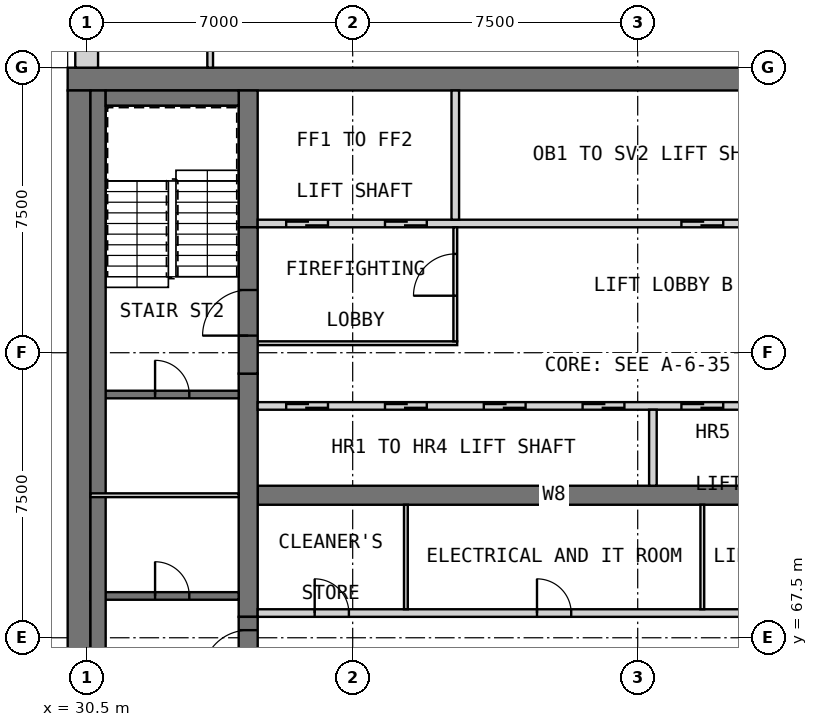
"""IFC4 building model, lengths in metres.
Left out: names, types, materials, properties, quantities, classifications, styles, units other than length and angle.
Written with IfcOpenShell. Run it as: python <this file> out.ifc"""

import sys

from ifc_helpers import new_model, si_unit, direction, frame, frame_2d, origin, place, context, subcontext, project, spatial, rectangle, extrude, element, fill, save


model = new_model("IFC4")
c1 = context("Model", 3, precision=1e-05, world=origin(), true_north=direction((0.0, 1.0)))
c2 = subcontext(c1, "Body", "Model", "MODEL_VIEW")
j1 = project(units=[si_unit("LENGTHUNIT", "METRE"), si_unit("PLANEANGLEUNIT", "RADIAN")], contexts=[c1])
p1 = place(None, origin())
s1 = spatial("IfcSite", under=j1, at=p1, CompositionType="ELEMENT")
p2 = place(p1, origin())
s2 = spatial("IfcBuilding", under=s1, at=p2, CompositionType="ELEMENT")
p3 = place(p2, frame((0.0, 0.0, 266.2)))
s3 = spatial("IfcBuildingStorey", under=s2, at=p3, CompositionType="ELEMENT", Elevation=266.2)
p4 = place(p3, frame((30.0, 82.2, 0.0), z_axis=(0.0, 0.0, 1.0), x_axis=(1.0, 0.0, 0.0)))
e1 = element("IfcWall", 1, at=p4, inside=s3, PredefinedType="SHEAR", context=c2, shape_type="SweptSolid", body=[
    extrude(rectangle(XDim=30.0, YDim=0.6, at=frame_2d((15.0, 0.0))), origin(), (0.0, 0.0, 1.0), 3.5),
])
p5 = place(p3, frame((30.3, 60.6, 0.0), z_axis=(0.0, 0.0, 1.0), x_axis=(0.0, 1.0, 0.0)))
e2 = element("IfcWall", 2, at=p5, inside=s3, PredefinedType="SHEAR", context=c2, shape_type="SweptSolid", body=[
    extrude(rectangle(XDim=21.3, YDim=0.6, at=frame_2d((10.65, 0.0))), origin(), (0.0, 0.0, 1.0), 3.5),
])
p6 = place(p3, frame((35.0, 71.25, 0.0), z_axis=(0.0, 0.0, 1.0), x_axis=(1.0, 0.0, 0.0)))
e3 = element("IfcWall", 3, at=p6, inside=s3, PredefinedType="SHEAR", context=c2, shape_type="SweptSolid", body=[
    extrude(rectangle(XDim=15.6, YDim=0.5, at=frame_2d((7.8, 0.0))), origin(), (0.0, 0.0, 1.0), 3.5),
])
p7 = place(p3, frame((34.75, 68.05, 0.0), z_axis=(0.0, 0.0, 1.0), x_axis=(0.0, 1.0, 0.0)))
e4 = element("IfcWall", 4, at=p7, inside=s3, PredefinedType="SHEAR", context=c2, shape_type="SweptSolid", body=[
    extrude(rectangle(XDim=6.4, YDim=0.5, at=frame_2d((3.2, 0.0))), origin(), (0.0, 0.0, 1.0), 3.5),
])
p8 = place(p3, frame((34.75, 78.3, 0.0), z_axis=(0.0, 0.0, 1.0), x_axis=(0.0, 1.0, 0.0)))
e5 = element("IfcWall", 5, at=p8, inside=s3, PredefinedType="SHEAR", context=c2, shape_type="SweptSolid", body=[
    extrude(rectangle(XDim=3.6, YDim=0.5, at=frame_2d((1.8, 0.0))), origin(), (0.0, 0.0, 1.0), 3.5),
])
p9 = place(p2, frame((0.0, 0.0, 34.0)))
s4 = spatial("IfcBuildingStorey", under=s2, at=p9, CompositionType="ELEMENT", Elevation=34.0)
for number, where, z_axis, x_axis in (
    (6, (29.7, 70.8, 0.0), (0.0, 0.0, 1.0), (0.0, 1.0, 0.0)),
    (7, (29.7, 75.675, 0.0), (0.0, 0.0, 1.0), (0.0, 1.0, 0.0)),
    (8, (29.7, 80.55, 0.0), (0.0, 0.0, 1.0), (0.0, 1.0, 0.0)),
):
    element("IfcWall", number, at=place(p9, frame(where, z_axis=z_axis, x_axis=x_axis)), inside=s4, PredefinedType="SOLIDWALL", context=c2, shape_type="SweptSolid", body=[
        extrude(rectangle(XDim=0.9, YDim=0.6, at=frame_2d((0.45, 0.0))), origin(), (0.0, 0.0, 1.0), 286.2),
    ])
p10 = place(p3, frame((30.5, 89.5, 0.0), z_axis=(0.0, 0.0, 1.0), x_axis=(0.0, -1.0, 0.0)))
e9 = element("IfcWall", 9, at=p10, inside=s3, PredefinedType="SOLIDWALL", context=c2, shape_type="SweptSolid", body=[
    extrude(rectangle(XDim=7.0, YDim=0.6, at=frame_2d((3.5, 0.0))), origin(), (0.0, 0.0, 1.0), 3.25),
])
p11 = place(p10, frame((3.925, 0.0, 0.8)))
e10 = element("IfcOpeningElement", 10, at=p11, cuts=e9, PredefinedType="OPENING", context=c2, shape_type="SweptSolid", body=[
    extrude(rectangle(XDim=2.4, YDim=1.8, at=frame_2d((1.2, 0.9))), frame((0.0, 0.31, 0.0), z_axis=(0.0, -1.0, 0.0), x_axis=(1.0, 0.0, 0.0)), (0.0, 0.0, 1.0), 0.62),
])
p12 = place(p10, frame((0.425, 0.0, 0.8)))
e11 = element("IfcOpeningElement", 11, at=p12, cuts=e9, PredefinedType="OPENING", context=c2, shape_type="SweptSolid", body=[
    extrude(rectangle(XDim=2.4, YDim=1.8, at=frame_2d((1.2, 0.9))), frame((0.0, 0.31, 0.0), z_axis=(0.0, -1.0, 0.0), x_axis=(1.0, 0.0, 0.0)), (0.0, 0.0, 1.0), 0.62),
])
p13 = place(p3, frame((35.0, 68.15, 0.0), z_axis=(0.0, 0.0, 1.0), x_axis=(1.0, 0.0, 0.0)))
e12 = element("IfcWall", 12, at=p13, inside=s3, PredefinedType="PARTITIONING", context=c2, shape_type="SweptSolid", body=[
    extrude(rectangle(XDim=15.6, YDim=0.2, at=frame_2d((7.8, 0.0))), origin(), (0.0, 0.0, 1.0), 3.25),
])
p14 = place(p13, frame((1.5, 0.0, 0.0)))
e13 = element("IfcOpeningElement", 13, at=p14, cuts=e12, PredefinedType="OPENING", context=c2, shape_type="SweptSolid", body=[
    extrude(rectangle(XDim=0.9, YDim=2.1, at=frame_2d((0.45, 1.05))), frame((0.0, 0.11, 0.0), z_axis=(0.0, -1.0, 0.0), x_axis=(1.0, 0.0, 0.0)), (0.0, 0.0, 1.0), 0.22),
])
p15 = place(p13, frame((7.35, 0.0, 0.0)))
e14 = element("IfcOpeningElement", 14, at=p15, cuts=e12, PredefinedType="OPENING", context=c2, shape_type="SweptSolid", body=[
    extrude(rectangle(XDim=0.9, YDim=2.1, at=frame_2d((0.45, 1.05))), frame((0.0, 0.11, 0.0), z_axis=(0.0, -1.0, 0.0), x_axis=(1.0, 0.0, 0.0)), (0.0, 0.0, 1.0), 0.22),
])
p16 = place(p13, frame((13.2, 0.0, 0.0)))
e15 = element("IfcOpeningElement", 15, at=p16, cuts=e12, PredefinedType="OPENING", context=c2, shape_type="SweptSolid", body=[
    extrude(rectangle(XDim=0.9, YDim=2.1, at=frame_2d((0.45, 1.05))), frame((0.0, 0.11, 0.0), z_axis=(0.0, -1.0, 0.0), x_axis=(1.0, 0.0, 0.0)), (0.0, 0.0, 1.0), 0.22),
])
for number, where, z_axis, x_axis in (
    (16, (38.9, 68.25, 0.0), (0.0, 0.0, 1.0), (0.0, 1.0, 0.0)),
    (17, (46.7, 68.25, 0.0), (0.0, 0.0, 1.0), (0.0, 1.0, 0.0)),
):
    element("IfcWall", number, at=place(p3, frame(where, z_axis=z_axis, x_axis=x_axis)), inside=s3, PredefinedType="PARTITIONING", context=c2, shape_type="SweptSolid", body=[
        extrude(rectangle(XDim=2.75, YDim=0.1, at=frame_2d((1.375, 0.0))), origin(), (0.0, 0.0, 1.0), 3.25),
    ])
p17 = place(p3, frame((35.0, 73.6, 0.0), z_axis=(0.0, 0.0, 1.0), x_axis=(1.0, 0.0, 0.0)))
e18 = element("IfcWall", 18, at=p17, inside=s3, PredefinedType="SOLIDWALL", context=c2, shape_type="SweptSolid", body=[
    extrude(rectangle(XDim=15.6, YDim=0.2, at=frame_2d((7.8, 0.0))), origin(), (0.0, 0.0, 1.0), 3.5),
])
p18 = place(p17, frame((0.75, 0.0, 0.0)))
e19 = element("IfcOpeningElement", 19, at=p18, cuts=e18, PredefinedType="OPENING", context=c2, shape_type="SweptSolid", body=[
    extrude(rectangle(XDim=1.1, YDim=2.1, at=frame_2d((0.55, 1.05))), frame((0.0, 0.11, 0.0), z_axis=(0.0, -1.0, 0.0), x_axis=(1.0, 0.0, 0.0)), (0.0, 0.0, 1.0), 0.22),
])
p19 = place(p17, frame((3.35, 0.0, 0.0)))
e20 = element("IfcOpeningElement", 20, at=p19, cuts=e18, PredefinedType="OPENING", context=c2, shape_type="SweptSolid", body=[
    extrude(rectangle(XDim=1.1, YDim=2.1, at=frame_2d((0.55, 1.05))), frame((0.0, 0.11, 0.0), z_axis=(0.0, -1.0, 0.0), x_axis=(1.0, 0.0, 0.0)), (0.0, 0.0, 1.0), 0.22),
])
p20 = place(p17, frame((5.95, 0.0, 0.0)))
e21 = element("IfcOpeningElement", 21, at=p20, cuts=e18, PredefinedType="OPENING", context=c2, shape_type="SweptSolid", body=[
    extrude(rectangle(XDim=1.1, YDim=2.1, at=frame_2d((0.55, 1.05))), frame((0.0, 0.11, 0.0), z_axis=(0.0, -1.0, 0.0), x_axis=(1.0, 0.0, 0.0)), (0.0, 0.0, 1.0), 0.22),
])
p21 = place(p17, frame((8.55, 0.0, 0.0)))
e22 = element("IfcOpeningElement", 22, at=p21, cuts=e18, PredefinedType="OPENING", context=c2, shape_type="SweptSolid", body=[
    extrude(rectangle(XDim=1.1, YDim=2.1, at=frame_2d((0.55, 1.05))), frame((0.0, 0.11, 0.0), z_axis=(0.0, -1.0, 0.0), x_axis=(1.0, 0.0, 0.0)), (0.0, 0.0, 1.0), 0.22),
])
p22 = place(p17, frame((11.15, 0.0, 0.0)))
e23 = element("IfcOpeningElement", 23, at=p22, cuts=e18, PredefinedType="OPENING", context=c2, shape_type="SweptSolid", body=[
    extrude(rectangle(XDim=1.1, YDim=2.1, at=frame_2d((0.55, 1.05))), frame((0.0, 0.11, 0.0), z_axis=(0.0, -1.0, 0.0), x_axis=(1.0, 0.0, 0.0)), (0.0, 0.0, 1.0), 0.22),
])
p23 = place(p17, frame((13.75, 0.0, 0.0)))
e24 = element("IfcOpeningElement", 24, at=p23, cuts=e18, PredefinedType="OPENING", context=c2, shape_type="SweptSolid", body=[
    extrude(rectangle(XDim=1.1, YDim=2.1, at=frame_2d((0.55, 1.05))), frame((0.0, 0.11, 0.0), z_axis=(0.0, -1.0, 0.0), x_axis=(1.0, 0.0, 0.0)), (0.0, 0.0, 1.0), 0.22),
])
p24 = place(p3, frame((45.4, 71.5, 0.0), z_axis=(0.0, 0.0, 1.0), x_axis=(0.0, 1.0, 0.0)))
e25 = element("IfcWall", 25, at=p24, inside=s3, PredefinedType="SOLIDWALL", context=c2, shape_type="SweptSolid", body=[
    extrude(rectangle(XDim=2.0, YDim=0.2, at=frame_2d((1.0, 0.0))), origin(), (0.0, 0.0, 1.0), 3.5),
])
p25 = place(p3, frame((35.0, 78.4, 0.0), z_axis=(0.0, 0.0, 1.0), x_axis=(1.0, 0.0, 0.0)))
e26 = element("IfcWall", 26, at=p25, inside=s3, PredefinedType="SOLIDWALL", context=c2, shape_type="SweptSolid", body=[
    extrude(rectangle(XDim=15.6, YDim=0.2, at=frame_2d((7.8, 0.0))), origin(), (0.0, 0.0, 1.0), 3.5),
])
p26 = place(p25, frame((0.75, 0.0, 0.0)))
e27 = element("IfcOpeningElement", 27, at=p26, cuts=e26, PredefinedType="OPENING", context=c2, shape_type="SweptSolid", body=[
    extrude(rectangle(XDim=1.1, YDim=2.1, at=frame_2d((0.55, 1.05))), frame((0.0, 0.11, 0.0), z_axis=(0.0, -1.0, 0.0), x_axis=(1.0, 0.0, 0.0)), (0.0, 0.0, 1.0), 0.22),
])
p27 = place(p25, frame((3.35, 0.0, 0.0)))
e28 = element("IfcOpeningElement", 28, at=p27, cuts=e26, PredefinedType="OPENING", context=c2, shape_type="SweptSolid", body=[
    extrude(rectangle(XDim=1.1, YDim=2.1, at=frame_2d((0.55, 1.05))), frame((0.0, 0.11, 0.0), z_axis=(0.0, -1.0, 0.0), x_axis=(1.0, 0.0, 0.0)), (0.0, 0.0, 1.0), 0.22),
])
p28 = place(p25, frame((11.15, 0.0, 0.0)))
e29 = element("IfcOpeningElement", 29, at=p28, cuts=e26, PredefinedType="OPENING", context=c2, shape_type="SweptSolid", body=[
    extrude(rectangle(XDim=1.1, YDim=2.1, at=frame_2d((0.55, 1.05))), frame((0.0, 0.11, 0.0), z_axis=(0.0, -1.0, 0.0), x_axis=(1.0, 0.0, 0.0)), (0.0, 0.0, 1.0), 0.22),
])
p29 = place(p25, frame((13.75, 0.0, 0.0)))
e30 = element("IfcOpeningElement", 30, at=p29, cuts=e26, PredefinedType="OPENING", context=c2, shape_type="SweptSolid", body=[
    extrude(rectangle(XDim=1.1, YDim=2.1, at=frame_2d((0.55, 1.05))), frame((0.0, 0.11, 0.0), z_axis=(0.0, -1.0, 0.0), x_axis=(1.0, 0.0, 0.0)), (0.0, 0.0, 1.0), 0.22),
])
p30 = place(p3, frame((40.2, 78.5, 0.0), z_axis=(0.0, 0.0, 1.0), x_axis=(0.0, 1.0, 0.0)))
e31 = element("IfcWall", 31, at=p30, inside=s3, PredefinedType="SOLIDWALL", context=c2, shape_type="SweptSolid", body=[
    extrude(rectangle(XDim=3.4, YDim=0.2, at=frame_2d((1.7, 0.0))), origin(), (0.0, 0.0, 1.0), 3.5),
])
p31 = place(p3, frame((35.0, 75.25, 0.0), z_axis=(0.0, 0.0, 1.0), x_axis=(1.0, 0.0, 0.0)))
e32 = element("IfcWall", 32, at=p31, inside=s3, PredefinedType="PARTITIONING", context=c2, shape_type="SweptSolid", body=[
    extrude(rectangle(XDim=5.25, YDim=0.1, at=frame_2d((2.625, 0.0))), origin(), (0.0, 0.0, 1.0), 3.25),
])
p32 = place(p3, frame((40.2, 75.3, 0.0), z_axis=(0.0, 0.0, 1.0), x_axis=(0.0, 1.0, 0.0)))
e33 = element("IfcWall", 33, at=p32, inside=s3, PredefinedType="PARTITIONING", context=c2, shape_type="SweptSolid", body=[
    extrude(rectangle(XDim=3.0, YDim=0.1, at=frame_2d((1.5, 0.0))), origin(), (0.0, 0.0, 1.0), 3.25),
])
p33 = place(p32, frame((1.2, 0.0, 0.0)))
e34 = element("IfcOpeningElement", 34, at=p33, cuts=e33, PredefinedType="OPENING", context=c2, shape_type="SweptSolid", body=[
    extrude(rectangle(XDim=1.1, YDim=2.1, at=frame_2d((0.55, 1.05))), frame((0.0, 0.06, 0.0), z_axis=(0.0, -1.0, 0.0), x_axis=(1.0, 0.0, 0.0)), (0.0, 0.0, 1.0), 0.12),
])
p34 = place(p3, frame((34.75, 64.2, 0.0), z_axis=(0.0, 0.0, 1.0), x_axis=(0.0, 1.0, 0.0)))
e35 = element("IfcWall", 35, at=p34, inside=s3, PredefinedType="SOLIDWALL", context=c2, shape_type="SweptSolid", body=[
    extrude(rectangle(XDim=3.85, YDim=0.5, at=frame_2d((1.925, 0.0))), origin(), (0.0, 0.0, 1.0), 2.3),
])
p35 = place(p34, frame((2.3, 0.0, 0.0)))
e36 = element("IfcOpeningElement", 36, at=p35, cuts=e35, PredefinedType="OPENING", context=c2, shape_type="SweptSolid", body=[
    extrude(rectangle(XDim=1.2, YDim=2.1, at=frame_2d((0.6, 1.05))), frame((0.0, 0.26, 0.0), z_axis=(0.0, -1.0, 0.0), x_axis=(1.0, 0.0, 0.0)), (0.0, 0.0, 1.0), 0.52),
])
p36 = place(p3, frame((34.75, 74.45, 0.0), z_axis=(0.0, 0.0, 1.0), x_axis=(0.0, 1.0, 0.0)))
e37 = element("IfcWall", 37, at=p36, inside=s3, PredefinedType="SOLIDWALL", context=c2, shape_type="SweptSolid", body=[
    extrude(rectangle(XDim=3.85, YDim=0.5, at=frame_2d((1.925, 0.0))), origin(), (0.0, 0.0, 1.0), 2.3),
])
p37 = place(p36, frame((1.0, 0.0, 0.0)))
e38 = element("IfcOpeningElement", 38, at=p37, cuts=e37, PredefinedType="OPENING", context=c2, shape_type="SweptSolid", body=[
    extrude(rectangle(XDim=1.2, YDim=2.1, at=frame_2d((0.6, 1.05))), frame((0.0, 0.26, 0.0), z_axis=(0.0, -1.0, 0.0), x_axis=(1.0, 0.0, 0.0)), (0.0, 0.0, 1.0), 0.52),
])
p38 = place(p3, frame((30.6, 68.6, 0.0), z_axis=(0.0, 0.0, 1.0), x_axis=(1.0, 0.0, 0.0)))
e39 = element("IfcWall", 39, at=p38, inside=s3, PredefinedType="SOLIDWALL", context=c2, shape_type="SweptSolid", body=[
    extrude(rectangle(XDim=3.9, YDim=0.2, at=frame_2d((1.95, 0.0))), origin(), (0.0, 0.0, 1.0), 3.25),
])
p39 = place(p38, frame((1.7, 0.0, 0.0)))
e40 = element("IfcOpeningElement", 40, at=p39, cuts=e39, PredefinedType="OPENING", context=c2, shape_type="SweptSolid", body=[
    extrude(rectangle(XDim=0.9, YDim=2.1, at=frame_2d((0.45, 1.05))), frame((0.0, 0.11, 0.0), z_axis=(0.0, -1.0, 0.0), x_axis=(1.0, 0.0, 0.0)), (0.0, 0.0, 1.0), 0.22),
])
p40 = place(p3, frame((30.6, 73.9, 0.0), z_axis=(0.0, 0.0, 1.0), x_axis=(1.0, 0.0, 0.0)))
e41 = element("IfcWall", 41, at=p40, inside=s3, PredefinedType="SOLIDWALL", context=c2, shape_type="SweptSolid", body=[
    extrude(rectangle(XDim=3.9, YDim=0.2, at=frame_2d((1.95, 0.0))), origin(), (0.0, 0.0, 1.0), 3.25),
])
p41 = place(p40, frame((1.7, 0.0, 0.0)))
e42 = element("IfcOpeningElement", 42, at=p41, cuts=e41, PredefinedType="OPENING", context=c2, shape_type="SweptSolid", body=[
    extrude(rectangle(XDim=0.9, YDim=2.1, at=frame_2d((0.45, 1.05))), frame((0.0, 0.11, 0.0), z_axis=(0.0, -1.0, 0.0), x_axis=(1.0, 0.0, 0.0)), (0.0, 0.0, 1.0), 0.22),
])
p42 = place(p3, frame((30.8, 60.6, 0.0), z_axis=(0.0, 0.0, 1.0), x_axis=(0.0, 1.0, 0.0)))
e43 = element("IfcWall", 43, at=p42, inside=s3, PredefinedType="SOLIDWALL", context=c2, shape_type="SweptSolid", body=[
    extrude(rectangle(XDim=21.3, YDim=0.4, at=frame_2d((10.65, 0.0))), origin(), (0.0, 0.0, 1.0), 3.25),
])
p43 = place(p3, frame((31.0, 81.7, 0.0), z_axis=(0.0, 0.0, 1.0), x_axis=(1.0, 0.0, 0.0)))
e44 = element("IfcWall", 44, at=p43, inside=s3, PredefinedType="SOLIDWALL", context=c2, shape_type="SweptSolid", body=[
    extrude(rectangle(XDim=3.5, YDim=0.4, at=frame_2d((1.75, 0.0))), origin(), (0.0, 0.0, 1.0), 3.25),
])
p44 = place(p3, frame((30.6, 71.25, 0.0), z_axis=(0.0, 0.0, 1.0), x_axis=(1.0, 0.0, 0.0)))
e45 = element("IfcWall", 45, at=p44, inside=s3, PredefinedType="PARTITIONING", context=c2, shape_type="SweptSolid", body=[
    extrude(rectangle(XDim=3.9, YDim=0.1, at=frame_2d((1.95, 0.0))), origin(), (0.0, 0.0, 1.0), 3.25),
])
p45 = place(p3, frame((33.75, 82.5, 0.0), z_axis=(0.0, 0.0, 1.0), x_axis=(0.0, 1.0, 0.0)))
e46 = element("IfcWall", 46, at=p45, inside=s3, PredefinedType="PARTITIONING", context=c2, shape_type="SweptSolid", body=[
    extrude(rectangle(XDim=1.725, YDim=0.15, at=frame_2d((0.863, 0.0))), origin(), (0.0, 0.0, 1.0), 3.25),
])
p46 = place(p14, origin())
e47 = element("IfcDoor", 47, at=p46, inside=s3, OperationType="SINGLE_SWING_RIGHT", PredefinedType="DOOR", context=c2, shape_type="SweptSolid", body=[
    extrude(rectangle(XDim=0.9, YDim=2.1, at=frame_2d((0.45, 1.05))), frame((0.0, 0.025, 0.0), z_axis=(0.0, -1.0, 0.0), x_axis=(1.0, 0.0, 0.0)), (0.0, 0.0, 1.0), 0.05),
])
fill(e13, e47)
p47 = place(p15, origin())
e48 = element("IfcDoor", 48, at=p47, inside=s3, OperationType="SINGLE_SWING_LEFT", PredefinedType="DOOR", context=c2, shape_type="SweptSolid", body=[
    extrude(rectangle(XDim=0.9, YDim=2.1, at=frame_2d((0.45, 1.05))), frame((0.0, 0.025, 0.0), z_axis=(0.0, -1.0, 0.0), x_axis=(1.0, 0.0, 0.0)), (0.0, 0.0, 1.0), 0.05),
])
fill(e14, e48)
p48 = place(p18, origin())
e49 = element("IfcDoor", 49, at=p48, inside=s3, OperationType="DOUBLE_DOOR_SLIDING", PredefinedType="DOOR", context=c2, shape_type="SweptSolid", body=[
    extrude(rectangle(XDim=1.1, YDim=2.1, at=frame_2d((0.55, 1.05))), frame((0.0, 0.025, 0.0), z_axis=(0.0, -1.0, 0.0), x_axis=(1.0, 0.0, 0.0)), (0.0, 0.0, 1.0), 0.05),
])
fill(e19, e49)
p49 = place(p19, origin())
e50 = element("IfcDoor", 50, at=p49, inside=s3, OperationType="DOUBLE_DOOR_SLIDING", PredefinedType="DOOR", context=c2, shape_type="SweptSolid", body=[
    extrude(rectangle(XDim=1.1, YDim=2.1, at=frame_2d((0.55, 1.05))), frame((0.0, 0.025, 0.0), z_axis=(0.0, -1.0, 0.0), x_axis=(1.0, 0.0, 0.0)), (0.0, 0.0, 1.0), 0.05),
])
fill(e20, e50)
p50 = place(p20, origin())
e51 = element("IfcDoor", 51, at=p50, inside=s3, OperationType="DOUBLE_DOOR_SLIDING", PredefinedType="DOOR", context=c2, shape_type="SweptSolid", body=[
    extrude(rectangle(XDim=1.1, YDim=2.1, at=frame_2d((0.55, 1.05))), frame((0.0, 0.025, 0.0), z_axis=(0.0, -1.0, 0.0), x_axis=(1.0, 0.0, 0.0)), (0.0, 0.0, 1.0), 0.05),
])
fill(e21, e51)
p51 = place(p21, origin())
e52 = element("IfcDoor", 52, at=p51, inside=s3, OperationType="DOUBLE_DOOR_SLIDING", PredefinedType="DOOR", context=c2, shape_type="SweptSolid", body=[
    extrude(rectangle(XDim=1.1, YDim=2.1, at=frame_2d((0.55, 1.05))), frame((0.0, 0.025, 0.0), z_axis=(0.0, -1.0, 0.0), x_axis=(1.0, 0.0, 0.0)), (0.0, 0.0, 1.0), 0.05),
])
fill(e22, e52)
p52 = place(p22, origin())
e53 = element("IfcDoor", 53, at=p52, inside=s3, OperationType="DOUBLE_DOOR_SLIDING", PredefinedType="DOOR", context=c2, shape_type="SweptSolid", body=[
    extrude(rectangle(XDim=1.1, YDim=2.1, at=frame_2d((0.55, 1.05))), frame((0.0, 0.025, 0.0), z_axis=(0.0, -1.0, 0.0), x_axis=(1.0, 0.0, 0.0)), (0.0, 0.0, 1.0), 0.05),
])
fill(e23, e53)
p53 = place(p26, origin())
e54 = element("IfcDoor", 54, at=p53, inside=s3, OperationType="DOUBLE_DOOR_SLIDING", PredefinedType="DOOR", context=c2, shape_type="SweptSolid", body=[
    extrude(rectangle(XDim=1.1, YDim=2.1, at=frame_2d((0.55, 1.05))), frame((0.0, 0.025, 0.0), z_axis=(0.0, -1.0, 0.0), x_axis=(1.0, 0.0, 0.0)), (0.0, 0.0, 1.0), 0.05),
])
fill(e27, e54)
p54 = place(p27, origin())
e55 = element("IfcDoor", 55, at=p54, inside=s3, OperationType="DOUBLE_DOOR_SLIDING", PredefinedType="DOOR", context=c2, shape_type="SweptSolid", body=[
    extrude(rectangle(XDim=1.1, YDim=2.1, at=frame_2d((0.55, 1.05))), frame((0.0, 0.025, 0.0), z_axis=(0.0, -1.0, 0.0), x_axis=(1.0, 0.0, 0.0)), (0.0, 0.0, 1.0), 0.05),
])
fill(e28, e55)
p55 = place(p28, origin())
e56 = element("IfcDoor", 56, at=p55, inside=s3, OperationType="DOUBLE_DOOR_SLIDING", PredefinedType="DOOR", context=c2, shape_type="SweptSolid", body=[
    extrude(rectangle(XDim=1.1, YDim=2.1, at=frame_2d((0.55, 1.05))), frame((0.0, 0.025, 0.0), z_axis=(0.0, -1.0, 0.0), x_axis=(1.0, 0.0, 0.0)), (0.0, 0.0, 1.0), 0.05),
])
fill(e29, e56)
p56 = place(p33, origin())
e57 = element("IfcDoor", 57, at=p56, inside=s3, OperationType="SINGLE_SWING_LEFT", PredefinedType="DOOR", context=c2, shape_type="SweptSolid", body=[
    extrude(rectangle(XDim=1.1, YDim=2.1, at=frame_2d((0.55, 1.05))), frame((0.0, 0.025, 0.0), z_axis=(0.0, -1.0, 0.0), x_axis=(1.0, 0.0, 0.0)), (0.0, 0.0, 1.0), 0.05),
])
fill(e34, e57)
p57 = place(p35, origin())
e58 = element("IfcDoor", 58, at=p57, inside=s3, OperationType="SINGLE_SWING_LEFT", PredefinedType="DOOR", context=c2, shape_type="SweptSolid", body=[
    extrude(rectangle(XDim=1.2, YDim=2.1, at=frame_2d((0.6, 1.05))), frame((0.0, 0.025, 0.0), z_axis=(0.0, -1.0, 0.0), x_axis=(1.0, 0.0, 0.0)), (0.0, 0.0, 1.0), 0.05),
])
fill(e36, e58)
p58 = place(p37, origin())
e59 = element("IfcDoor", 59, at=p58, inside=s3, OperationType="SINGLE_SWING_RIGHT", PredefinedType="DOOR", context=c2, shape_type="SweptSolid", body=[
    extrude(rectangle(XDim=1.2, YDim=2.1, at=frame_2d((0.6, 1.05))), frame((0.0, 0.025, 0.0), z_axis=(0.0, -1.0, 0.0), x_axis=(1.0, 0.0, 0.0)), (0.0, 0.0, 1.0), 0.05),
])
fill(e38, e59)
p59 = place(p39, origin())
e60 = element("IfcDoor", 60, at=p59, inside=s3, OperationType="SINGLE_SWING_LEFT", PredefinedType="DOOR", context=c2, shape_type="SweptSolid", body=[
    extrude(rectangle(XDim=0.9, YDim=2.1, at=frame_2d((0.45, 1.05))), frame((0.0, 0.025, 0.0), z_axis=(0.0, -1.0, 0.0), x_axis=(1.0, 0.0, 0.0)), (0.0, 0.0, 1.0), 0.05),
])
fill(e40, e60)
p60 = place(p41, origin())
e61 = element("IfcDoor", 61, at=p60, inside=s3, OperationType="SINGLE_SWING_RIGHT", PredefinedType="DOOR", context=c2, shape_type="SweptSolid", body=[
    extrude(rectangle(XDim=0.9, YDim=2.1, at=frame_2d((0.45, 1.05))), frame((0.0, 0.025, 0.0), z_axis=(0.0, -1.0, 0.0), x_axis=(1.0, 0.0, 0.0)), (0.0, 0.0, 1.0), 0.05),
])
fill(e42, e61)
save(model, sys.argv[1])
